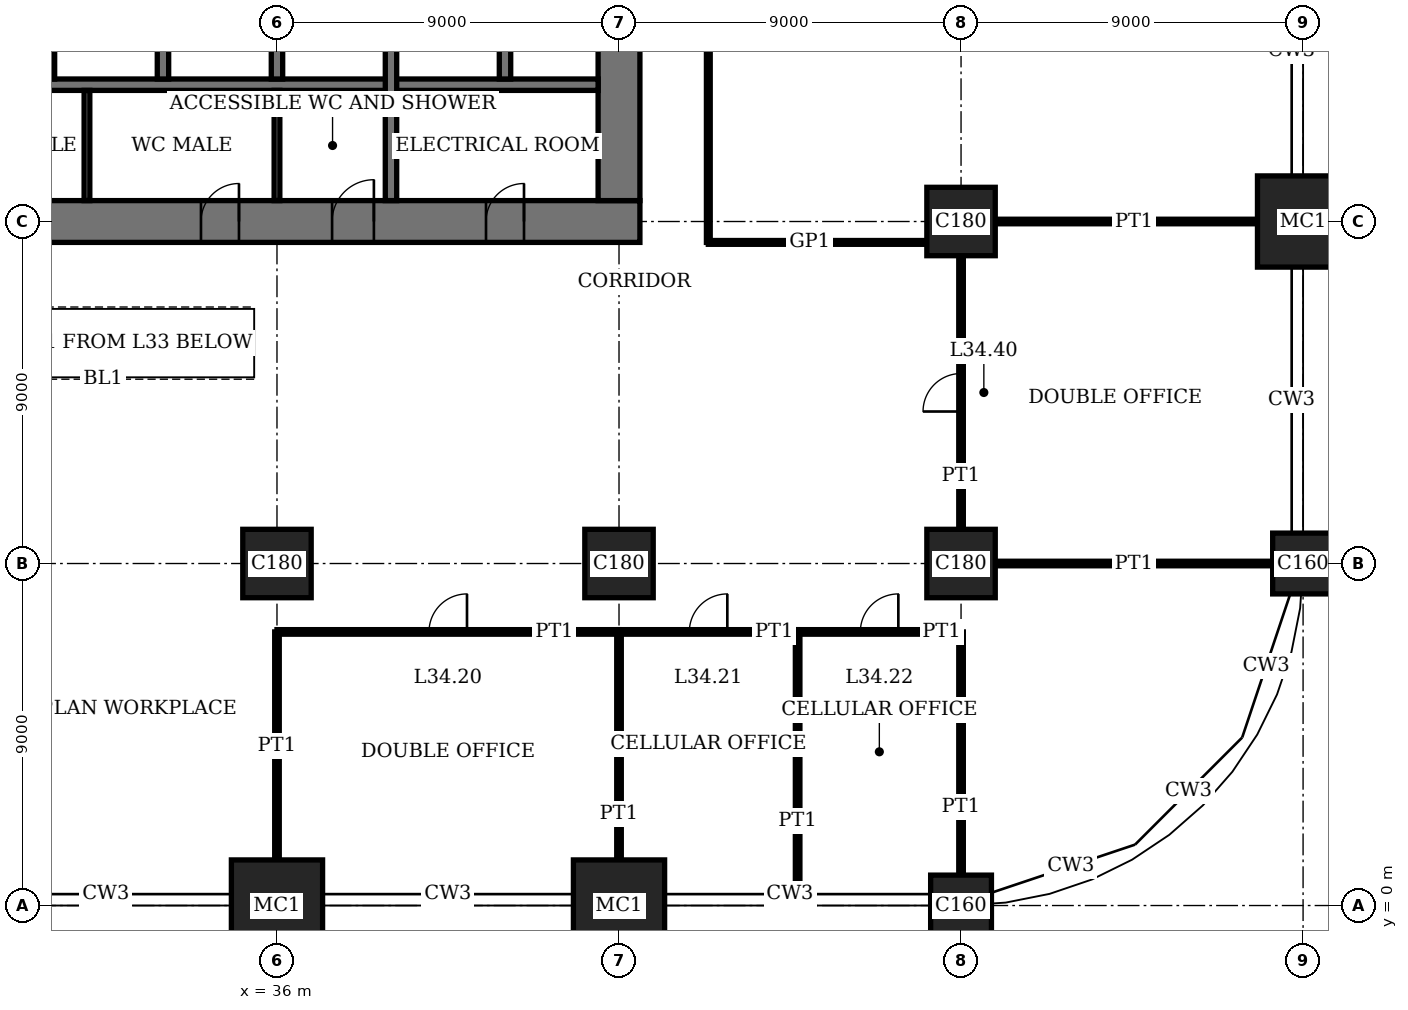
"""IFC4 building model, lengths in metres.
Left out: names, types, materials, properties, quantities, classifications, styles, units other than length and angle.
Written with IfcOpenShell. Run it as: python <this file> out.ifc"""

import sys

from ifc_helpers import new_model, si_unit, direction, frame, frame_2d, origin, origin_2d, place, context, subcontext, project, spatial, rectangle, extrude, element, fill, save


model = new_model("IFC4")
c1 = context("Model", 3, precision=1e-05, world=origin(), true_north=direction((0.0, 1.0)))
c2 = subcontext(c1, "Body", "Model", "MODEL_VIEW")
j1 = project(units=[si_unit("LENGTHUNIT", "METRE"), si_unit("PLANEANGLEUNIT", "RADIAN")], contexts=[c1])
p1 = place(None, origin())
s1 = spatial("IfcSite", under=j1, at=p1, CompositionType="ELEMENT")
p2 = place(p1, origin())
s2 = spatial("IfcBuilding", under=s1, at=p2, CompositionType="ELEMENT")
p3 = place(p2, frame((0.0, 0.0, 141.0)))
s3 = spatial("IfcBuildingStorey", under=s2, at=p3, CompositionType="ELEMENT", Elevation=141.0)
p4 = place(p3, frame((36.0, 0.0, 0.0), z_axis=(0.0, 0.0, 1.0), x_axis=(1.0, 0.0, 0.0)))
e1 = element("IfcColumn", 1, at=p4, inside=s3, PredefinedType="COLUMN", context=c2, shape_type="SweptSolid", body=[
    extrude(rectangle(XDim=2.4, YDim=2.4, at=origin_2d()), origin(), (0.0, 0.0, 1.0), 4.0),
])
p5 = place(p3, frame((36.0, 9.0, 0.0), z_axis=(0.0, 0.0, 1.0), x_axis=(1.0, 0.0, 0.0)))
e2 = element("IfcColumn", 2, at=p5, inside=s3, PredefinedType="COLUMN", context=c2, shape_type="SweptSolid", body=[
    extrude(rectangle(XDim=1.8, YDim=1.8, at=origin_2d()), origin(), (0.0, 0.0, 1.0), 4.0),
])
p6 = place(p3, frame((45.0, 0.0, 0.0), z_axis=(0.0, 0.0, 1.0), x_axis=(1.0, 0.0, 0.0)))
e3 = element("IfcColumn", 3, at=p6, inside=s3, PredefinedType="COLUMN", context=c2, shape_type="SweptSolid", body=[
    extrude(rectangle(XDim=2.4, YDim=2.4, at=origin_2d()), origin(), (0.0, 0.0, 1.0), 4.0),
])
p7 = place(p3, frame((45.0, 9.0, 0.0), z_axis=(0.0, 0.0, 1.0), x_axis=(1.0, 0.0, 0.0)))
e4 = element("IfcColumn", 4, at=p7, inside=s3, PredefinedType="COLUMN", context=c2, shape_type="SweptSolid", body=[
    extrude(rectangle(XDim=1.8, YDim=1.8, at=origin_2d()), origin(), (0.0, 0.0, 1.0), 4.0),
])
p8 = place(p3, frame((54.0, 0.0, 0.0), z_axis=(0.0, 0.0, 1.0), x_axis=(1.0, 0.0, 0.0)))
e5 = element("IfcColumn", 5, at=p8, inside=s3, PredefinedType="COLUMN", context=c2, shape_type="SweptSolid", body=[
    extrude(rectangle(XDim=1.6, YDim=1.6, at=origin_2d()), origin(), (0.0, 0.0, 1.0), 4.0),
])
for number, where, z_axis, x_axis in (
    (6, (54.0, 9.0, 0.0), (0.0, 0.0, 1.0), (1.0, 0.0, 0.0)),
    (7, (54.0, 18.0, 0.0), (0.0, 0.0, 1.0), (1.0, 0.0, 0.0)),
):
    element("IfcColumn", number, at=place(p3, frame(where, z_axis=z_axis, x_axis=x_axis)), inside=s3, PredefinedType="COLUMN", context=c2, shape_type="SweptSolid", body=[
        extrude(rectangle(XDim=1.8, YDim=1.8, at=origin_2d()), origin(), (0.0, 0.0, 1.0), 4.0),
    ])
p9 = place(p3, frame((63.0, 9.0, 0.0), z_axis=(0.0, 0.0, 1.0), x_axis=(1.0, 0.0, 0.0)))
e8 = element("IfcColumn", 8, at=p9, inside=s3, PredefinedType="COLUMN", context=c2, shape_type="SweptSolid", body=[
    extrude(rectangle(XDim=1.6, YDim=1.6, at=origin_2d()), origin(), (0.0, 0.0, 1.0), 4.0),
])
p10 = place(p3, frame((63.0, 18.0, 0.0), z_axis=(0.0, 0.0, 1.0), x_axis=(1.0, 0.0, 0.0)))
e9 = element("IfcColumn", 9, at=p10, inside=s3, PredefinedType="COLUMN", context=c2, shape_type="SweptSolid", body=[
    extrude(rectangle(XDim=2.4, YDim=2.4, at=origin_2d()), origin(), (0.0, 0.0, 1.0), 4.0),
])
p11 = place(p3, frame((17.45, 18.0, 0.0), z_axis=(0.0, 0.0, 1.0), x_axis=(1.0, 0.0, 0.0)))
e10 = element("IfcWall", 10, at=p11, inside=s3, PredefinedType="SHEAR", context=c2, shape_type="SweptSolid", body=[
    extrude(rectangle(XDim=28.1, YDim=1.1, at=frame_2d((14.05, 0.0))), origin(), (0.0, 0.0, 1.0), 4.0),
])
p12 = place(p11, frame((11.55, 0.0, 0.0)))
e11 = element("IfcOpeningElement", 11, at=p12, cuts=e10, PredefinedType="OPENING", context=c2, shape_type="SweptSolid", body=[
    extrude(rectangle(XDim=1.0, YDim=2.4, at=frame_2d((0.5, 1.2))), frame((0.0, 0.56, 0.0), z_axis=(0.0, -1.0, 0.0), x_axis=(1.0, 0.0, 0.0)), (0.0, 0.0, 1.0), 1.12),
])
p13 = place(p11, frame((16.55, 0.0, 0.0)))
e12 = element("IfcOpeningElement", 12, at=p13, cuts=e10, PredefinedType="OPENING", context=c2, shape_type="SweptSolid", body=[
    extrude(rectangle(XDim=1.0, YDim=2.4, at=frame_2d((0.5, 1.2))), frame((0.0, 0.56, 0.0), z_axis=(0.0, -1.0, 0.0), x_axis=(1.0, 0.0, 0.0)), (0.0, 0.0, 1.0), 1.12),
])
p14 = place(p11, frame((20.0, 0.0, 0.0)))
e13 = element("IfcOpeningElement", 13, at=p14, cuts=e10, PredefinedType="OPENING", context=c2, shape_type="SweptSolid", body=[
    extrude(rectangle(XDim=1.1, YDim=2.4, at=frame_2d((0.55, 1.2))), frame((0.0, 0.56, 0.0), z_axis=(0.0, -1.0, 0.0), x_axis=(1.0, 0.0, 0.0)), (0.0, 0.0, 1.0), 1.12),
])
p15 = place(p11, frame((24.05, 0.0, 0.0)))
e14 = element("IfcOpeningElement", 14, at=p15, cuts=e10, PredefinedType="OPENING", context=c2, shape_type="SweptSolid", body=[
    extrude(rectangle(XDim=1.0, YDim=2.4, at=frame_2d((0.5, 1.2))), frame((0.0, 0.56, 0.0), z_axis=(0.0, -1.0, 0.0), x_axis=(1.0, 0.0, 0.0)), (0.0, 0.0, 1.0), 1.12),
])
p16 = place(p3, frame((45.0, 18.55, 0.0), z_axis=(0.0, 0.0, 1.0), x_axis=(0.0, 1.0, 0.0)))
e15 = element("IfcWall", 15, at=p16, inside=s3, PredefinedType="SHEAR", context=c2, shape_type="SweptSolid", body=[
    extrude(rectangle(XDim=16.9, YDim=1.1, at=frame_2d((8.45, 0.0))), origin(), (0.0, 0.0, 1.0), 4.0),
])
p17 = place(p16, frame((8.45, 0.0, 0.0)))
e16 = element("IfcOpeningElement", 16, at=p17, cuts=e15, PredefinedType="OPENING", context=c2, shape_type="SweptSolid", body=[
    extrude(rectangle(XDim=1.8, YDim=2.4, at=frame_2d((0.9, 1.2))), frame((0.0, 0.56, 0.0), z_axis=(0.0, -1.0, 0.0), x_axis=(1.0, 0.0, 0.0)), (0.0, 0.0, 1.0), 1.12),
])
p18 = place(p3, frame((27.15, 21.6, 0.0), z_axis=(0.0, 0.0, 1.0), x_axis=(1.0, 0.0, 0.0)))
e17 = element("IfcWall", 17, at=p18, inside=s3, PredefinedType="SHEAR", context=c2, shape_type="SweptSolid", body=[
    extrude(rectangle(XDim=17.3, YDim=0.3, at=frame_2d((8.65, 0.0))), origin(), (0.0, 0.0, 1.0), 4.0),
])
for number, where, z_axis, x_axis in (
    (18, (30.0, 21.75, 0.0), (0.0, 0.0, 1.0), (0.0, 1.0, 0.0)),
    (19, (33.0, 21.75, 0.0), (0.0, 0.0, 1.0), (0.0, 1.0, 0.0)),
    (20, (36.0, 21.75, 0.0), (0.0, 0.0, 1.0), (0.0, 1.0, 0.0)),
):
    element("IfcWall", number, at=place(p3, frame(where, z_axis=z_axis, x_axis=x_axis)), inside=s3, PredefinedType="SHEAR", context=c2, shape_type="SweptSolid", body=[
        extrude(rectangle(XDim=2.7, YDim=0.3, at=frame_2d((1.35, 0.0))), origin(), (0.0, 0.0, 1.0), 4.0),
    ])
p19 = place(p3, frame((39.0, 18.55, 0.0), z_axis=(0.0, 0.0, 1.0), x_axis=(0.0, 1.0, 0.0)))
e21 = element("IfcWall", 21, at=p19, inside=s3, PredefinedType="SHEAR", context=c2, shape_type="SweptSolid", body=[
    extrude(rectangle(XDim=5.9, YDim=0.3, at=frame_2d((2.95, 0.0))), origin(), (0.0, 0.0, 1.0), 4.0),
])
p20 = place(p3, frame((42.0, 21.75, 0.0), z_axis=(0.0, 0.0, 1.0), x_axis=(0.0, 1.0, 0.0)))
e22 = element("IfcWall", 22, at=p20, inside=s3, PredefinedType="SHEAR", context=c2, shape_type="SweptSolid", body=[
    extrude(rectangle(XDim=2.7, YDim=0.3, at=frame_2d((1.35, 0.0))), origin(), (0.0, 0.0, 1.0), 4.0),
])
p21 = place(p3, frame((36.0, 7.2, 0.0), z_axis=(0.0, 0.0, 1.0), x_axis=(1.0, 0.0, 0.0)))
e23 = element("IfcWall", 23, at=p21, inside=s3, PredefinedType="PARTITIONING", context=c2, shape_type="SweptSolid", body=[
    extrude(rectangle(XDim=9.0, YDim=0.12, at=frame_2d((4.5, 0.0))), origin(), (0.0, 0.0, 1.0), 3.75),
])
p22 = place(p21, frame((4.0, 0.0, 0.0)))
e24 = element("IfcOpeningElement", 24, at=p22, cuts=e23, PredefinedType="OPENING", context=c2, shape_type="SweptSolid", body=[
    extrude(rectangle(XDim=1.0, YDim=2.4, at=frame_2d((0.5, 1.2))), frame((0.0, 0.07, 0.0), z_axis=(0.0, -1.0, 0.0), x_axis=(1.0, 0.0, 0.0)), (0.0, 0.0, 1.0), 0.14),
])
p23 = place(p3, frame((45.0, 7.2, 0.0), z_axis=(0.0, 0.0, 1.0), x_axis=(1.0, 0.0, 0.0)))
e25 = element("IfcWall", 25, at=p23, inside=s3, PredefinedType="PARTITIONING", context=c2, shape_type="SweptSolid", body=[
    extrude(rectangle(XDim=4.7, YDim=0.12, at=frame_2d((2.35, 0.0))), origin(), (0.0, 0.0, 1.0), 3.75),
])
p24 = place(p23, frame((1.85, 0.0, 0.0)))
e26 = element("IfcOpeningElement", 26, at=p24, cuts=e25, PredefinedType="OPENING", context=c2, shape_type="SweptSolid", body=[
    extrude(rectangle(XDim=1.0, YDim=2.4, at=frame_2d((0.5, 1.2))), frame((0.0, 0.07, 0.0), z_axis=(0.0, -1.0, 0.0), x_axis=(1.0, 0.0, 0.0)), (0.0, 0.0, 1.0), 0.14),
])
p25 = place(p3, frame((49.7, 7.2, 0.0), z_axis=(0.0, 0.0, 1.0), x_axis=(1.0, 0.0, 0.0)))
e27 = element("IfcWall", 27, at=p25, inside=s3, PredefinedType="PARTITIONING", context=c2, shape_type="SweptSolid", body=[
    extrude(rectangle(XDim=4.3, YDim=0.12, at=frame_2d((2.15, 0.0))), origin(), (0.0, 0.0, 1.0), 3.75),
])
p26 = place(p25, frame((1.65, 0.0, 0.0)))
e28 = element("IfcOpeningElement", 28, at=p26, cuts=e27, PredefinedType="OPENING", context=c2, shape_type="SweptSolid", body=[
    extrude(rectangle(XDim=1.0, YDim=2.4, at=frame_2d((0.5, 1.2))), frame((0.0, 0.07, 0.0), z_axis=(0.0, -1.0, 0.0), x_axis=(1.0, 0.0, 0.0)), (0.0, 0.0, 1.0), 0.14),
])
p27 = place(p3, frame((54.9, 9.0, 0.0), z_axis=(0.0, 0.0, 1.0), x_axis=(1.0, 0.0, 0.0)))
e29 = element("IfcWall", 29, at=p27, inside=s3, PredefinedType="PARTITIONING", context=c2, shape_type="SweptSolid", body=[
    extrude(rectangle(XDim=7.3, YDim=0.12, at=frame_2d((3.65, 0.0))), origin(), (0.0, 0.0, 1.0), 3.05),
])
p28 = place(p3, frame((47.35, 17.45, 0.0), z_axis=(0.0, 0.0, 1.0), x_axis=(1.0, 0.0, 0.0)))
e30 = element("IfcWall", 30, at=p28, inside=s3, PredefinedType="PARTITIONING", context=c2, shape_type="SweptSolid", body=[
    extrude(rectangle(XDim=5.75, YDim=0.1, at=frame_2d((2.875, 0.0))), origin(), (0.0, 0.0, 1.0), 3.05),
])
p29 = place(p3, frame((54.9, 18.0, 0.0), z_axis=(0.0, 0.0, 1.0), x_axis=(1.0, 0.0, 0.0)))
e31 = element("IfcWall", 31, at=p29, inside=s3, PredefinedType="PARTITIONING", context=c2, shape_type="SweptSolid", body=[
    extrude(rectangle(XDim=6.9, YDim=0.12, at=frame_2d((3.45, 0.0))), origin(), (0.0, 0.0, 1.0), 3.05),
])
for number, where, z_axis, x_axis in (
    (32, (36.0, 1.2, 0.0), (0.0, 0.0, 1.0), (0.0, 1.0, 0.0)),
    (33, (45.0, 1.2, 0.0), (0.0, 0.0, 1.0), (0.0, 1.0, 0.0)),
):
    element("IfcWall", number, at=place(p3, frame(where, z_axis=z_axis, x_axis=x_axis)), inside=s3, PredefinedType="PARTITIONING", context=c2, shape_type="SweptSolid", body=[
        extrude(rectangle(XDim=6.0, YDim=0.12, at=frame_2d((3.0, 0.0))), origin(), (0.0, 0.0, 1.0), 3.05),
    ])
p30 = place(p3, frame((47.35, 17.45, 0.0), z_axis=(0.0, 0.0, 1.0), x_axis=(0.0, 1.0, 0.0)))
e34 = element("IfcWall", 34, at=p30, inside=s3, PredefinedType="PARTITIONING", context=c2, shape_type="SweptSolid", body=[
    extrude(rectangle(XDim=19.1, YDim=0.1, at=frame_2d((9.55, 0.0))), origin(), (0.0, 0.0, 1.0), 3.75),
])
p31 = place(p30, frame((9.05, 0.0, 0.0)))
e35 = element("IfcOpeningElement", 35, at=p31, cuts=e34, PredefinedType="OPENING", context=c2, shape_type="SweptSolid", body=[
    extrude(rectangle(XDim=1.0, YDim=2.4, at=frame_2d((0.5, 1.2))), frame((0.0, 0.06, 0.0), z_axis=(0.0, -1.0, 0.0), x_axis=(1.0, 0.0, 0.0)), (0.0, 0.0, 1.0), 0.12),
])
p32 = place(p3, frame((49.7, 0.31, 0.0), z_axis=(0.0, 0.0, 1.0), x_axis=(0.0, 1.0, 0.0)))
e36 = element("IfcWall", 36, at=p32, inside=s3, PredefinedType="PARTITIONING", context=c2, shape_type="SweptSolid", body=[
    extrude(rectangle(XDim=6.89, YDim=0.12, at=frame_2d((3.445, 0.0))), origin(), (0.0, 0.0, 1.0), 3.75),
])
p33 = place(p3, frame((54.0, 0.8, 0.0), z_axis=(0.0, 0.0, 1.0), x_axis=(0.0, 1.0, 0.0)))
e37 = element("IfcWall", 37, at=p33, inside=s3, PredefinedType="PARTITIONING", context=c2, shape_type="SweptSolid", body=[
    extrude(rectangle(XDim=6.4, YDim=0.12, at=frame_2d((3.2, 0.0))), origin(), (0.0, 0.0, 1.0), 3.05),
])
p34 = place(p3, frame((54.0, 9.9, 0.0), z_axis=(0.0, 0.0, 1.0), x_axis=(0.0, 1.0, 0.0)))
e38 = element("IfcWall", 38, at=p34, inside=s3, PredefinedType="PARTITIONING", context=c2, shape_type="SweptSolid", body=[
    extrude(rectangle(XDim=7.2, YDim=0.12, at=frame_2d((3.6, 0.0))), origin(), (0.0, 0.0, 1.0), 3.05),
])
p35 = place(p34, frame((3.1, 0.0, 0.0)))
e39 = element("IfcOpeningElement", 39, at=p35, cuts=e38, PredefinedType="OPENING", context=c2, shape_type="SweptSolid", body=[
    extrude(rectangle(XDim=1.0, YDim=2.4, at=frame_2d((0.5, 1.2))), frame((0.0, 0.07, 0.0), z_axis=(0.0, -1.0, 0.0), x_axis=(1.0, 0.0, 0.0)), (0.0, 0.0, 1.0), 0.14),
])
for number, where, z_axis, x_axis in (
    (40, (31.0, 18.55, 0.0), (0.0, 0.0, 1.0), (0.0, 1.0, 0.0)),
    (41, (36.0, 18.55, 0.0), (0.0, 0.0, 1.0), (0.0, 1.0, 0.0)),
):
    element("IfcWall", number, at=place(p3, frame(where, z_axis=z_axis, x_axis=x_axis)), inside=s3, PredefinedType="PARTITIONING", context=c2, shape_type="SweptSolid", body=[
        extrude(rectangle(XDim=2.9, YDim=0.15, at=frame_2d((1.45, 0.0))), origin(), (0.0, 0.0, 1.0), 3.75),
    ])
p36 = place(p13, origin())
e42 = element("IfcDoor", 42, at=p36, inside=s3, OperationType="SINGLE_SWING_LEFT", PredefinedType="DOOR", context=c2, shape_type="SweptSolid", body=[
    extrude(rectangle(XDim=1.0, YDim=2.4, at=frame_2d((0.5, 1.2))), frame((0.0, 0.025, 0.0), z_axis=(0.0, -1.0, 0.0), x_axis=(1.0, 0.0, 0.0)), (0.0, 0.0, 1.0), 0.05),
    extrude(rectangle(XDim=0.04, YDim=2.4, at=frame_2d((0.02, 1.2))), frame((0.0, 0.4, 0.0), z_axis=(0.0, -1.0, 0.0), x_axis=(1.0, 0.0, 0.0)), (0.0, 0.0, 1.0), 0.8),
    extrude(rectangle(XDim=0.04, YDim=2.4, at=frame_2d((0.98, 1.2))), frame((0.0, 0.4, 0.0), z_axis=(0.0, -1.0, 0.0), x_axis=(1.0, 0.0, 0.0)), (0.0, 0.0, 1.0), 0.8),
    extrude(rectangle(XDim=1.0, YDim=0.04, at=frame_2d((0.5, 2.38))), frame((0.0, 0.4, 0.0), z_axis=(0.0, -1.0, 0.0), x_axis=(1.0, 0.0, 0.0)), (0.0, 0.0, 1.0), 0.8),
])
fill(e12, e42)
p37 = place(p14, origin())
e43 = element("IfcDoor", 43, at=p37, inside=s3, OperationType="SINGLE_SWING_LEFT", PredefinedType="DOOR", context=c2, shape_type="SweptSolid", body=[
    extrude(rectangle(XDim=1.1, YDim=2.4, at=frame_2d((0.55, 1.2))), frame((0.0, 0.025, 0.0), z_axis=(0.0, -1.0, 0.0), x_axis=(1.0, 0.0, 0.0)), (0.0, 0.0, 1.0), 0.05),
    extrude(rectangle(XDim=0.04, YDim=2.4, at=frame_2d((0.02, 1.2))), frame((0.0, 0.44, 0.0), z_axis=(0.0, -1.0, 0.0), x_axis=(1.0, 0.0, 0.0)), (0.0, 0.0, 1.0), 0.88),
    extrude(rectangle(XDim=0.04, YDim=2.4, at=frame_2d((1.08, 1.2))), frame((0.0, 0.44, 0.0), z_axis=(0.0, -1.0, 0.0), x_axis=(1.0, 0.0, 0.0)), (0.0, 0.0, 1.0), 0.88),
    extrude(rectangle(XDim=1.1, YDim=0.04, at=frame_2d((0.55, 2.38))), frame((0.0, 0.44, 0.0), z_axis=(0.0, -1.0, 0.0), x_axis=(1.0, 0.0, 0.0)), (0.0, 0.0, 1.0), 0.88),
])
fill(e13, e43)
p38 = place(p15, origin())
e44 = element("IfcDoor", 44, at=p38, inside=s3, OperationType="SINGLE_SWING_LEFT", PredefinedType="DOOR", context=c2, shape_type="SweptSolid", body=[
    extrude(rectangle(XDim=1.0, YDim=2.4, at=frame_2d((0.5, 1.2))), frame((0.0, 0.025, 0.0), z_axis=(0.0, -1.0, 0.0), x_axis=(1.0, 0.0, 0.0)), (0.0, 0.0, 1.0), 0.05),
    extrude(rectangle(XDim=0.04, YDim=2.4, at=frame_2d((0.02, 1.2))), frame((0.0, 0.4, 0.0), z_axis=(0.0, -1.0, 0.0), x_axis=(1.0, 0.0, 0.0)), (0.0, 0.0, 1.0), 0.8),
    extrude(rectangle(XDim=0.04, YDim=2.4, at=frame_2d((0.98, 1.2))), frame((0.0, 0.4, 0.0), z_axis=(0.0, -1.0, 0.0), x_axis=(1.0, 0.0, 0.0)), (0.0, 0.0, 1.0), 0.8),
    extrude(rectangle(XDim=1.0, YDim=0.04, at=frame_2d((0.5, 2.38))), frame((0.0, 0.4, 0.0), z_axis=(0.0, -1.0, 0.0), x_axis=(1.0, 0.0, 0.0)), (0.0, 0.0, 1.0), 0.8),
])
fill(e14, e44)
p39 = place(p22, origin())
e45 = element("IfcDoor", 45, at=p39, inside=s3, OperationType="SINGLE_SWING_LEFT", PredefinedType="DOOR", context=c2, shape_type="SweptSolid", body=[
    extrude(rectangle(XDim=1.0, YDim=2.4, at=frame_2d((0.5, 1.2))), frame((0.0, 0.025, 0.0), z_axis=(0.0, -1.0, 0.0), x_axis=(1.0, 0.0, 0.0)), (0.0, 0.0, 1.0), 0.05),
])
fill(e24, e45)
p40 = place(p24, origin())
e46 = element("IfcDoor", 46, at=p40, inside=s3, OperationType="SINGLE_SWING_LEFT", PredefinedType="DOOR", context=c2, shape_type="SweptSolid", body=[
    extrude(rectangle(XDim=1.0, YDim=2.4, at=frame_2d((0.5, 1.2))), frame((0.0, 0.025, 0.0), z_axis=(0.0, -1.0, 0.0), x_axis=(1.0, 0.0, 0.0)), (0.0, 0.0, 1.0), 0.05),
])
fill(e26, e46)
p41 = place(p26, origin())
e47 = element("IfcDoor", 47, at=p41, inside=s3, OperationType="SINGLE_SWING_LEFT", PredefinedType="DOOR", context=c2, shape_type="SweptSolid", body=[
    extrude(rectangle(XDim=1.0, YDim=2.4, at=frame_2d((0.5, 1.2))), frame((0.0, 0.025, 0.0), z_axis=(0.0, -1.0, 0.0), x_axis=(1.0, 0.0, 0.0)), (0.0, 0.0, 1.0), 0.05),
])
fill(e28, e47)
p42 = place(p35, origin())
e48 = element("IfcDoor", 48, at=p42, inside=s3, OperationType="SINGLE_SWING_RIGHT", PredefinedType="DOOR", context=c2, shape_type="SweptSolid", body=[
    extrude(rectangle(XDim=1.0, YDim=2.4, at=frame_2d((0.5, 1.2))), frame((0.0, 0.025, 0.0), z_axis=(0.0, -1.0, 0.0), x_axis=(1.0, 0.0, 0.0)), (0.0, 0.0, 1.0), 0.05),
])
fill(e39, e48)
save(model, sys.argv[1])
